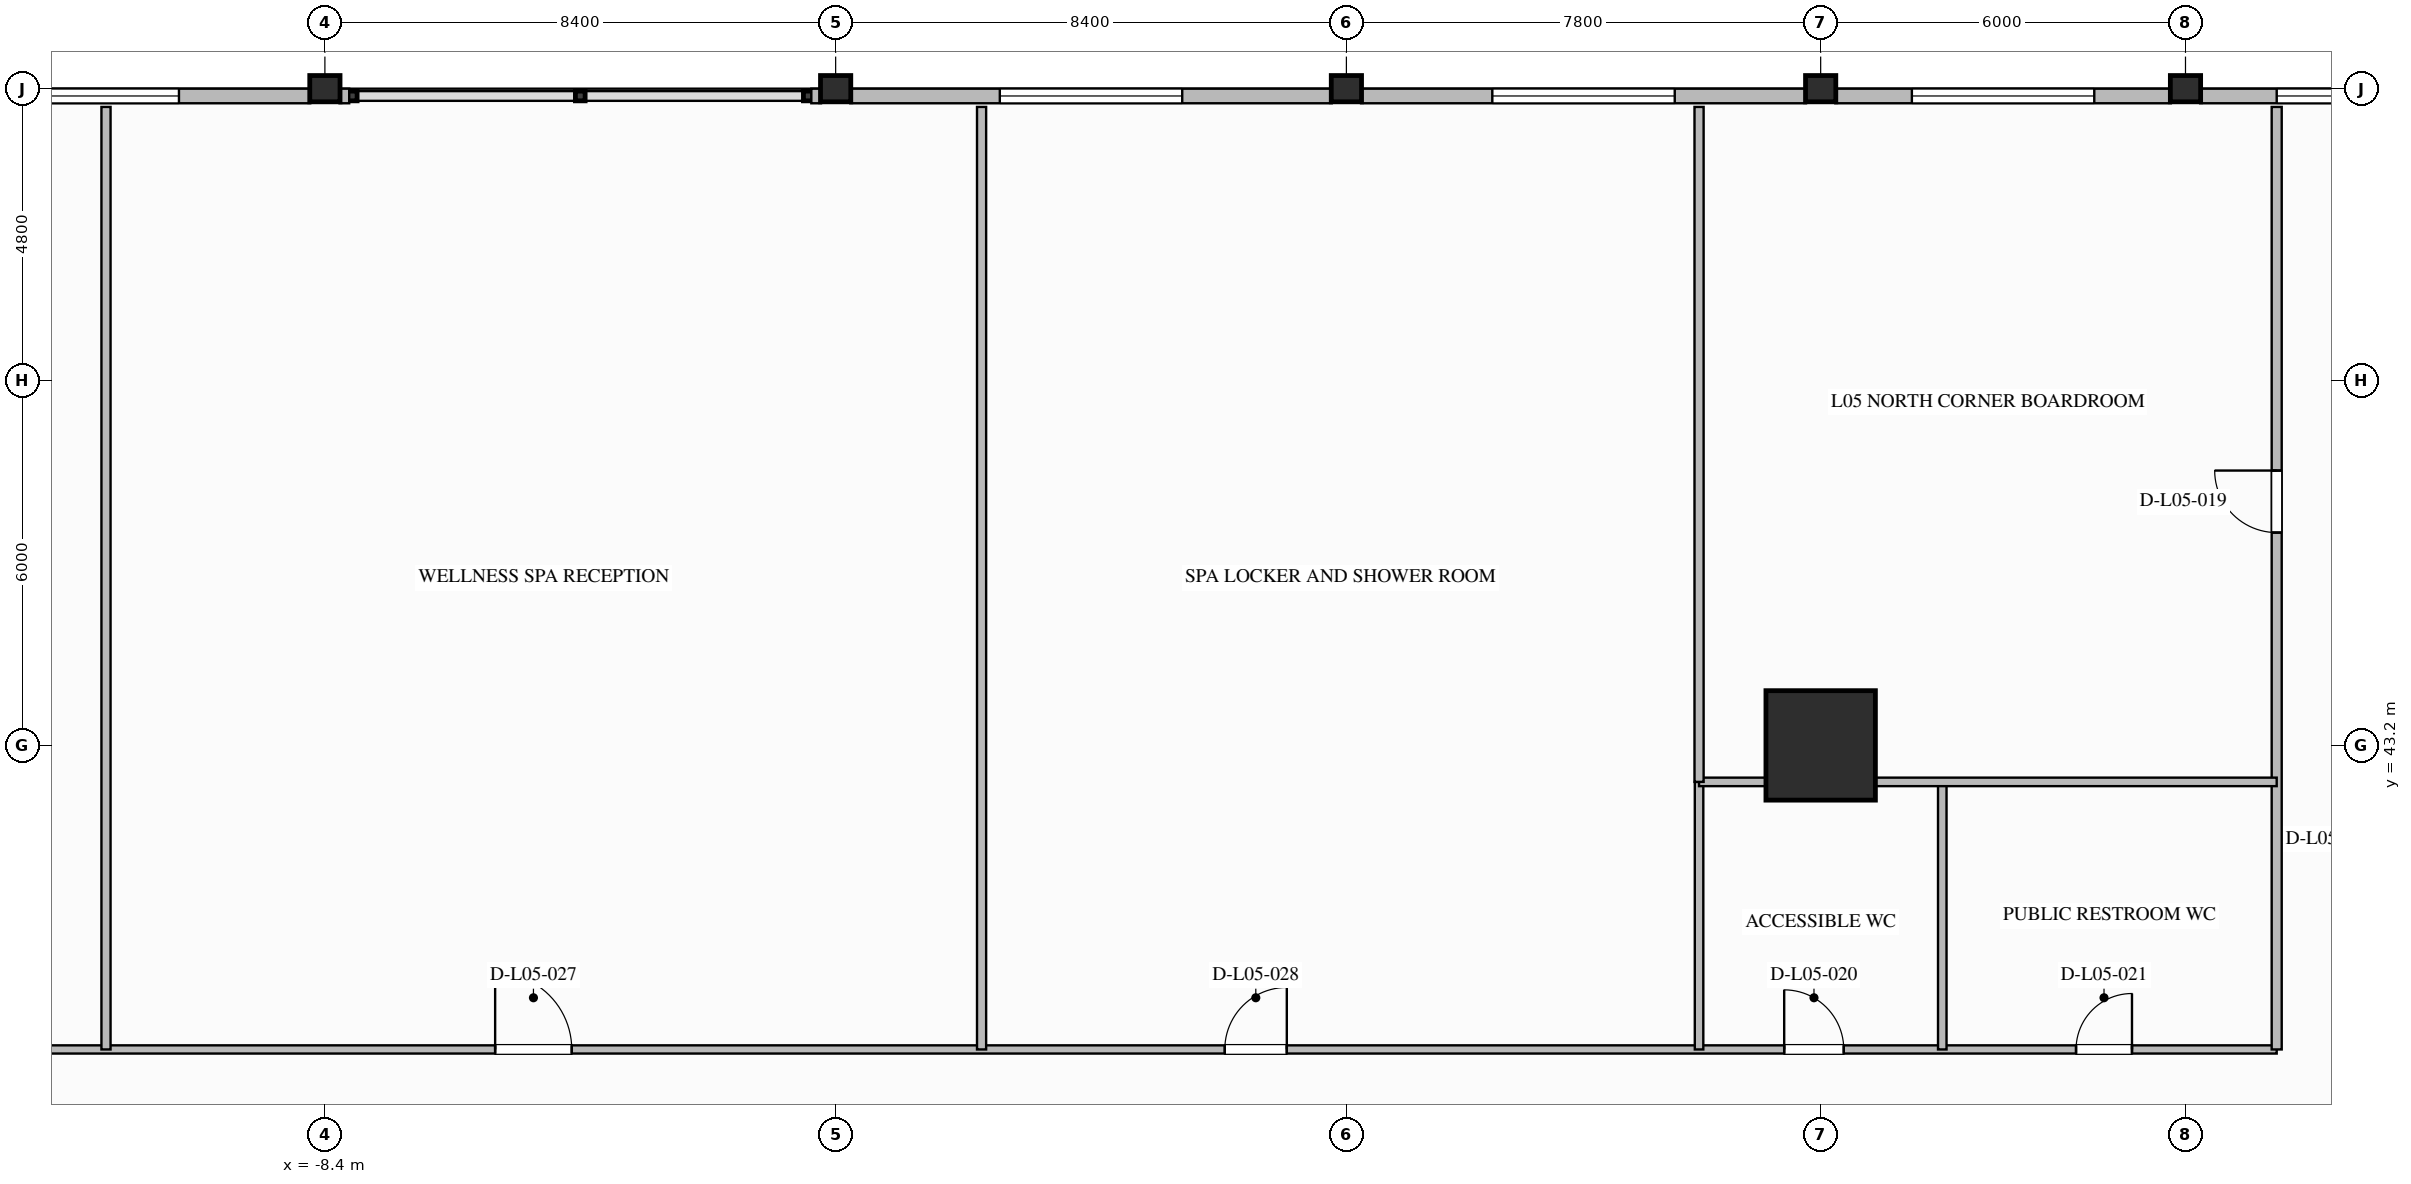
"""IFC4 building model, lengths in metres.
Left out: names, types, materials, properties, quantities, classifications, styles, units other than length and angle.
Written with IfcOpenShell. Run it as: python <this file> out.ifc"""

import sys

from ifc_helpers import new_model, si_unit, direction, frame, frame_2d, origin, origin_2d, place, context, subcontext, project, spatial, rectangle, i_section, extrude, element, fill, save


model = new_model("IFC4")
c1 = context("Model", 3, precision=1e-05, world=origin(), true_north=direction((0.0, 1.0)))
c2 = subcontext(c1, "Body", "Model", "MODEL_VIEW")
j1 = project(units=[si_unit("LENGTHUNIT", "METRE"), si_unit("PLANEANGLEUNIT", "RADIAN")], contexts=[c1])
p1 = place(None, origin())
s1 = spatial("IfcSite", under=j1, at=p1, CompositionType="ELEMENT")
p2 = place(p1, origin())
s2 = spatial("IfcBuilding", under=s1, at=p2, CompositionType="ELEMENT")
p3 = place(p2, frame((0.0, 0.0, 27.6)))
s3 = spatial("IfcBuildingStorey", under=s2, at=p3, CompositionType="ELEMENT", Elevation=27.6)
p4 = place(p3, frame((16.2, 43.2, 0.0), z_axis=(0.0, 0.0, 1.0), x_axis=(1.0, 0.0, 0.0)))
e1 = element("IfcColumn", 1, at=p4, inside=s3, PredefinedType="COLUMN", context=c2, shape_type="SweptSolid", body=[
    extrude(rectangle(XDim=1.8, YDim=1.8, at=origin_2d()), origin(), (0.0, 0.0, 1.0), 5.6),
])
for number, where, z_axis, x_axis in (
    (2, (-8.4, 54.0, 0.0), (0.0, 0.0, 1.0), (0.0, 1.0, 0.0)),
    (3, (0.0, 54.0, 0.0), (0.0, 0.0, 1.0), (0.0, 1.0, 0.0)),
    (4, (8.4, 54.0, 0.0), (0.0, 0.0, 1.0), (0.0, 1.0, 0.0)),
    (5, (16.2, 54.0, 0.0), (0.0, 0.0, 1.0), (0.0, 1.0, 0.0)),
    (6, (22.2, 54.0, 0.0), (0.0, 0.0, 1.0), (0.0, 1.0, 0.0)),
):
    element("IfcColumn", number, at=place(p3, frame(where, z_axis=z_axis, x_axis=x_axis)), inside=s3, PredefinedType="COLUMN", context=c2, shape_type="SweptSolid", body=[
        extrude(i_section(OverallWidth=0.432, OverallDepth=0.498, WebThickness=0.056, FlangeThickness=0.089, FilletRadius=0.03, at=origin_2d()), origin(), (0.0, 0.0, 1.0), 5.32),
    ])
p5 = place(p3, frame((-15.959, 53.88, 0.0), z_axis=(0.0, 0.0, 1.0), x_axis=(1.0, 0.0, 0.0)))
e7 = element("IfcWall", 7, at=p5, inside=s3, PredefinedType="STANDARD", context=c2, shape_type="SweptSolid", body=[
    extrude(rectangle(XDim=7.318, YDim=0.24, at=frame_2d((3.659, 0.0))), origin(), (0.0, 0.0, 1.0), 3.52),
])
p6 = place(p5, frame((2.159, 0.0, 0.65)))
e8 = element("IfcOpeningElement", 8, at=p6, cuts=e7, PredefinedType="OPENING", context=c2, shape_type="SweptSolid", body=[
    extrude(rectangle(XDim=3.0, YDim=2.2, at=frame_2d((1.5, 1.1))), frame((0.0, 0.13, 0.0), z_axis=(0.0, -1.0, 0.0), x_axis=(1.0, 0.0, 0.0)), (0.0, 0.0, 1.0), 0.26),
])
p7 = place(p3, frame((-8.159, 53.88, 0.0), z_axis=(0.0, 0.0, 1.0), x_axis=(1.0, 0.0, 0.0)))
e9 = element("IfcWall", 9, at=p7, inside=s3, PredefinedType="STANDARD", context=c2, shape_type="SweptSolid", body=[
    extrude(rectangle(XDim=0.159, YDim=0.24, at=frame_2d((0.08, 0.0))), origin(), (0.0, 0.0, 1.0), 5.32),
])
p8 = place(p3, frame((-0.4, 53.88, 0.0), z_axis=(0.0, 0.0, 1.0), x_axis=(1.0, 0.0, 0.0)))
e10 = element("IfcWall", 10, at=p8, inside=s3, PredefinedType="STANDARD", context=c2, shape_type="SweptSolid", body=[
    extrude(rectangle(XDim=0.159, YDim=0.24, at=frame_2d((0.08, 0.0))), origin(), (0.0, 0.0, 1.0), 5.32),
])
p9 = place(p3, frame((0.241, 53.88, 0.0), z_axis=(0.0, 0.0, 1.0), x_axis=(1.0, 0.0, 0.0)))
e11 = element("IfcWall", 11, at=p9, inside=s3, PredefinedType="STANDARD", context=c2, shape_type="SweptSolid", body=[
    extrude(rectangle(XDim=7.918, YDim=0.24, at=frame_2d((3.959, 0.0))), origin(), (0.0, 0.0, 1.0), 3.52),
])
p10 = place(p9, frame((2.459, 0.0, 0.65)))
e12 = element("IfcOpeningElement", 12, at=p10, cuts=e11, PredefinedType="OPENING", context=c2, shape_type="SweptSolid", body=[
    extrude(rectangle(XDim=3.0, YDim=2.2, at=frame_2d((1.5, 1.1))), frame((0.0, 0.13, 0.0), z_axis=(0.0, -1.0, 0.0), x_axis=(1.0, 0.0, 0.0)), (0.0, 0.0, 1.0), 0.26),
])
p11 = place(p3, frame((8.641, 53.88, 0.0), z_axis=(0.0, 0.0, 1.0), x_axis=(1.0, 0.0, 0.0)))
e13 = element("IfcWall", 13, at=p11, inside=s3, PredefinedType="STANDARD", context=c2, shape_type="SweptSolid", body=[
    extrude(rectangle(XDim=7.318, YDim=0.24, at=frame_2d((3.659, 0.0))), origin(), (0.0, 0.0, 1.0), 3.52),
])
p12 = place(p11, frame((2.159, 0.0, 0.65)))
e14 = element("IfcOpeningElement", 14, at=p12, cuts=e13, PredefinedType="OPENING", context=c2, shape_type="SweptSolid", body=[
    extrude(rectangle(XDim=3.0, YDim=2.2, at=frame_2d((1.5, 1.1))), frame((0.0, 0.13, 0.0), z_axis=(0.0, -1.0, 0.0), x_axis=(1.0, 0.0, 0.0)), (0.0, 0.0, 1.0), 0.26),
])
p13 = place(p3, frame((16.441, 53.88, 0.0), z_axis=(0.0, 0.0, 1.0), x_axis=(1.0, 0.0, 0.0)))
e15 = element("IfcWall", 15, at=p13, inside=s3, PredefinedType="STANDARD", context=c2, shape_type="SweptSolid", body=[
    extrude(rectangle(XDim=5.518, YDim=0.24, at=frame_2d((2.759, 0.0))), origin(), (0.0, 0.0, 1.0), 4.625),
])
p14 = place(p13, frame((1.259, 0.0, 0.65)))
e16 = element("IfcOpeningElement", 16, at=p14, cuts=e15, PredefinedType="OPENING", context=c2, shape_type="SweptSolid", body=[
    extrude(rectangle(XDim=3.0, YDim=2.2, at=frame_2d((1.5, 1.1))), frame((0.0, 0.13, 0.0), z_axis=(0.0, -1.0, 0.0), x_axis=(1.0, 0.0, 0.0)), (0.0, 0.0, 1.0), 0.26),
])
p15 = place(p3, frame((22.441, 53.88, 0.0), z_axis=(0.0, 0.0, 1.0), x_axis=(1.0, 0.0, 0.0)))
e17 = element("IfcWall", 17, at=p15, inside=s3, PredefinedType="STANDARD", context=c2, shape_type="SweptSolid", body=[
    extrude(rectangle(XDim=4.318, YDim=0.24, at=frame_2d((2.159, 0.0))), origin(), (0.0, 0.0, 1.0), 4.625),
])
p16 = place(p15, frame((1.259, 0.0, 0.65)))
e18 = element("IfcOpeningElement", 18, at=p16, cuts=e17, PredefinedType="OPENING", context=c2, shape_type="SweptSolid", body=[
    extrude(rectangle(XDim=1.8, YDim=2.2, at=frame_2d((0.9, 1.1))), frame((0.0, 0.13, 0.0), z_axis=(0.0, -1.0, 0.0), x_axis=(1.0, 0.0, 0.0)), (0.0, 0.0, 1.0), 0.26),
])
p17 = place(p3, frame((-23.6, 38.2, 0.0), z_axis=(0.0, 0.0, 1.0), x_axis=(1.0, 0.0, 0.0)))
e19 = element("IfcWall", 19, at=p17, inside=s3, PredefinedType="PARTITIONING", context=c2, shape_type="SweptSolid", body=[
    extrude(rectangle(XDim=47.3, YDim=0.135, at=frame_2d((23.65, 0.0))), origin(), (0.0, 0.0, 1.0), 5.32),
])
p18 = place(p17, frame((39.2, 0.0, 0.0)))
e20 = element("IfcOpeningElement", 20, at=p18, cuts=e19, PredefinedType="OPENING", context=c2, shape_type="SweptSolid", body=[
    extrude(rectangle(XDim=0.98, YDim=2.1, at=frame_2d((0.49, 1.05))), frame((0.0, 0.077, 0.0), z_axis=(0.0, -1.0, 0.0), x_axis=(1.0, 0.0, 0.0)), (0.0, 0.0, 1.0), 0.155),
])
p19 = place(p17, frame((44.0, 0.0, 0.0)))
e21 = element("IfcOpeningElement", 21, at=p19, cuts=e19, PredefinedType="OPENING", context=c2, shape_type="SweptSolid", body=[
    extrude(rectangle(XDim=0.92, YDim=2.1, at=frame_2d((0.46, 1.05))), frame((0.0, 0.077, 0.0), z_axis=(0.0, -1.0, 0.0), x_axis=(1.0, 0.0, 0.0)), (0.0, 0.0, 1.0), 0.155),
])
p20 = place(p17, frame((8.0, 0.0, 0.0)))
e22 = element("IfcOpeningElement", 22, at=p20, cuts=e19, PredefinedType="OPENING", context=c2, shape_type="SweptSolid", body=[
    extrude(rectangle(XDim=1.26, YDim=2.2, at=frame_2d((0.63, 1.1))), frame((0.0, 0.077, 0.0), z_axis=(0.0, -1.0, 0.0), x_axis=(1.0, 0.0, 0.0)), (0.0, 0.0, 1.0), 0.155),
])
p21 = place(p17, frame((18.0, 0.0, 0.0)))
e23 = element("IfcOpeningElement", 23, at=p21, cuts=e19, PredefinedType="OPENING", context=c2, shape_type="SweptSolid", body=[
    extrude(rectangle(XDim=1.26, YDim=2.2, at=frame_2d((0.63, 1.1))), frame((0.0, 0.077, 0.0), z_axis=(0.0, -1.0, 0.0), x_axis=(1.0, 0.0, 0.0)), (0.0, 0.0, 1.0), 0.155),
])
p22 = place(p17, frame((30.0, 0.0, 0.0)))
e24 = element("IfcOpeningElement", 24, at=p22, cuts=e19, PredefinedType="OPENING", context=c2, shape_type="SweptSolid", body=[
    extrude(rectangle(XDim=1.02, YDim=2.15, at=frame_2d((0.51, 1.075))), frame((0.0, 0.077, 0.0), z_axis=(0.0, -1.0, 0.0), x_axis=(1.0, 0.0, 0.0)), (0.0, 0.0, 1.0), 0.155),
])
p23 = place(p3, frame((23.7, 38.2, 0.0), z_axis=(0.0, 0.0, 1.0), x_axis=(0.0, 1.0, 0.0)))
e25 = element("IfcWall", 25, at=p23, inside=s3, PredefinedType="PARTITIONING", context=c2, shape_type="SweptSolid", body=[
    extrude(rectangle(XDim=15.5, YDim=0.165, at=frame_2d((7.75, 0.0))), origin(), (0.0, 0.0, 1.0), 5.32),
])
p24 = place(p23, frame((8.5, 0.0, 0.0)))
e26 = element("IfcOpeningElement", 26, at=p24, cuts=e25, PredefinedType="OPENING", context=c2, shape_type="SweptSolid", body=[
    extrude(rectangle(XDim=1.02, YDim=2.15, at=frame_2d((0.51, 1.075))), frame((0.0, 0.093, 0.0), z_axis=(0.0, -1.0, 0.0), x_axis=(1.0, 0.0, 0.0)), (0.0, 0.0, 1.0), 0.185),
])
for number, where, z_axis, x_axis in (
    (27, (14.2, 38.2, 0.0), (0.0, 0.0, 1.0), (0.0, 1.0, 0.0)),
    (28, (18.2, 38.2, 0.0), (0.0, 0.0, 1.0), (0.0, 1.0, 0.0)),
):
    element("IfcWall", number, at=place(p3, frame(where, z_axis=z_axis, x_axis=x_axis)), inside=s3, PredefinedType="PLUMBINGWALL", context=c2, shape_type="SweptSolid", body=[
        extrude(rectangle(XDim=4.4, YDim=0.14, at=frame_2d((2.2, 0.0))), origin(), (0.0, 0.0, 1.0), 5.32),
    ])
p25 = place(p3, frame((14.2, 42.6, 0.0), z_axis=(0.0, 0.0, 1.0), x_axis=(1.0, 0.0, 0.0)))
e29 = element("IfcWall", 29, at=p25, inside=s3, PredefinedType="PLUMBINGWALL", context=c2, shape_type="SweptSolid", body=[
    extrude(rectangle(XDim=9.5, YDim=0.14, at=frame_2d((4.75, 0.0))), origin(), (0.0, 0.0, 1.0), 5.32),
])
p26 = place(p3, frame((14.2, 42.6, 0.0), z_axis=(0.0, 0.0, 1.0), x_axis=(0.0, 1.0, 0.0)))
e30 = element("IfcWall", 30, at=p26, inside=s3, PredefinedType="PARTITIONING", context=c2, shape_type="SweptSolid", body=[
    extrude(rectangle(XDim=11.1, YDim=0.15, at=frame_2d((5.55, 0.0))), origin(), (0.0, 0.0, 1.0), 5.32),
])
for number, where, z_axis, x_axis in (
    (31, (-12.0, 38.2, 0.0), (0.0, 0.0, 1.0), (0.0, 1.0, 0.0)),
    (32, (2.4, 38.2, 0.0), (0.0, 0.0, 1.0), (0.0, 1.0, 0.0)),
):
    element("IfcWall", number, at=place(p3, frame(where, z_axis=z_axis, x_axis=x_axis)), inside=s3, PredefinedType="PARTITIONING", context=c2, shape_type="SweptSolid", body=[
        extrude(rectangle(XDim=15.5, YDim=0.15, at=frame_2d((7.75, 0.0))), origin(), (0.0, 0.0, 1.0), 5.32),
    ])
p27 = place(p6, origin())
e33 = element("IfcWindow", 33, at=p27, inside=s3, PartitioningType="SINGLE_PANEL", PredefinedType="WINDOW", context=c2, shape_type="SweptSolid", body=[
    extrude(rectangle(XDim=3.0, YDim=2.2, at=frame_2d((1.5, 1.1))), frame((0.0, 0.03, 0.0), z_axis=(0.0, -1.0, 0.0), x_axis=(1.0, 0.0, 0.0)), (0.0, 0.0, 1.0), 0.06),
])
fill(e8, e33)
p28 = place(p10, origin())
e34 = element("IfcWindow", 34, at=p28, inside=s3, PartitioningType="SINGLE_PANEL", PredefinedType="WINDOW", context=c2, shape_type="SweptSolid", body=[
    extrude(rectangle(XDim=3.0, YDim=2.2, at=frame_2d((1.5, 1.1))), frame((0.0, 0.03, 0.0), z_axis=(0.0, -1.0, 0.0), x_axis=(1.0, 0.0, 0.0)), (0.0, 0.0, 1.0), 0.06),
])
fill(e12, e34)
p29 = place(p12, origin())
e35 = element("IfcWindow", 35, at=p29, inside=s3, PartitioningType="SINGLE_PANEL", PredefinedType="WINDOW", context=c2, shape_type="SweptSolid", body=[
    extrude(rectangle(XDim=3.0, YDim=2.2, at=frame_2d((1.5, 1.1))), frame((0.0, 0.03, 0.0), z_axis=(0.0, -1.0, 0.0), x_axis=(1.0, 0.0, 0.0)), (0.0, 0.0, 1.0), 0.06),
])
fill(e14, e35)
p30 = place(p14, origin())
e36 = element("IfcWindow", 36, at=p30, inside=s3, PartitioningType="SINGLE_PANEL", PredefinedType="WINDOW", context=c2, shape_type="SweptSolid", body=[
    extrude(rectangle(XDim=3.0, YDim=2.2, at=frame_2d((1.5, 1.1))), frame((0.0, 0.03, 0.0), z_axis=(0.0, -1.0, 0.0), x_axis=(1.0, 0.0, 0.0)), (0.0, 0.0, 1.0), 0.06),
])
fill(e16, e36)
p31 = place(p16, origin())
e37 = element("IfcWindow", 37, at=p31, inside=s3, PartitioningType="SINGLE_PANEL", PredefinedType="WINDOW", context=c2, shape_type="SweptSolid", body=[
    extrude(rectangle(XDim=1.8, YDim=2.2, at=frame_2d((0.9, 1.1))), frame((0.0, 0.03, 0.0), z_axis=(0.0, -1.0, 0.0), x_axis=(1.0, 0.0, 0.0)), (0.0, 0.0, 1.0), 0.06),
])
fill(e18, e37)
p32 = place(p24, origin())
e38 = element("IfcDoor", 38, at=p32, inside=s3, OperationType="SINGLE_SWING_RIGHT", PredefinedType="DOOR", context=c2, shape_type="SweptSolid", body=[
    extrude(rectangle(XDim=1.02, YDim=2.15, at=frame_2d((0.51, 1.075))), frame((0.0, 0.025, 0.0), z_axis=(0.0, -1.0, 0.0), x_axis=(1.0, 0.0, 0.0)), (0.0, 0.0, 1.0), 0.05),
])
fill(e26, e38)
p33 = place(p18, origin())
e39 = element("IfcDoor", 39, at=p33, inside=s3, OperationType="SINGLE_SWING_LEFT", PredefinedType="DOOR", context=c2, shape_type="SweptSolid", body=[
    extrude(rectangle(XDim=0.98, YDim=2.1, at=frame_2d((0.49, 1.05))), frame((0.0, 0.025, 0.0), z_axis=(0.0, -1.0, 0.0), x_axis=(1.0, 0.0, 0.0)), (0.0, 0.0, 1.0), 0.05),
])
fill(e20, e39)
p34 = place(p19, origin())
e40 = element("IfcDoor", 40, at=p34, inside=s3, OperationType="SINGLE_SWING_RIGHT", PredefinedType="DOOR", context=c2, shape_type="SweptSolid", body=[
    extrude(rectangle(XDim=0.92, YDim=2.1, at=frame_2d((0.46, 1.05))), frame((0.0, 0.025, 0.0), z_axis=(0.0, -1.0, 0.0), x_axis=(1.0, 0.0, 0.0)), (0.0, 0.0, 1.0), 0.05),
])
fill(e21, e40)
p35 = place(p21, origin())
e41 = element("IfcDoor", 41, at=p35, inside=s3, OperationType="SINGLE_SWING_LEFT", PredefinedType="DOOR", context=c2, shape_type="SweptSolid", body=[
    extrude(rectangle(XDim=1.26, YDim=2.2, at=frame_2d((0.63, 1.1))), frame((0.0, 0.025, 0.0), z_axis=(0.0, -1.0, 0.0), x_axis=(1.0, 0.0, 0.0)), (0.0, 0.0, 1.0), 0.05),
])
fill(e23, e41)
p36 = place(p22, origin())
e42 = element("IfcDoor", 42, at=p36, inside=s3, OperationType="SINGLE_SWING_RIGHT", PredefinedType="DOOR", context=c2, shape_type="SweptSolid", body=[
    extrude(rectangle(XDim=1.02, YDim=2.15, at=frame_2d((0.51, 1.075))), frame((0.0, 0.025, 0.0), z_axis=(0.0, -1.0, 0.0), x_axis=(1.0, 0.0, 0.0)), (0.0, 0.0, 1.0), 0.05),
])
fill(e24, e42)
save(model, sys.argv[1])
